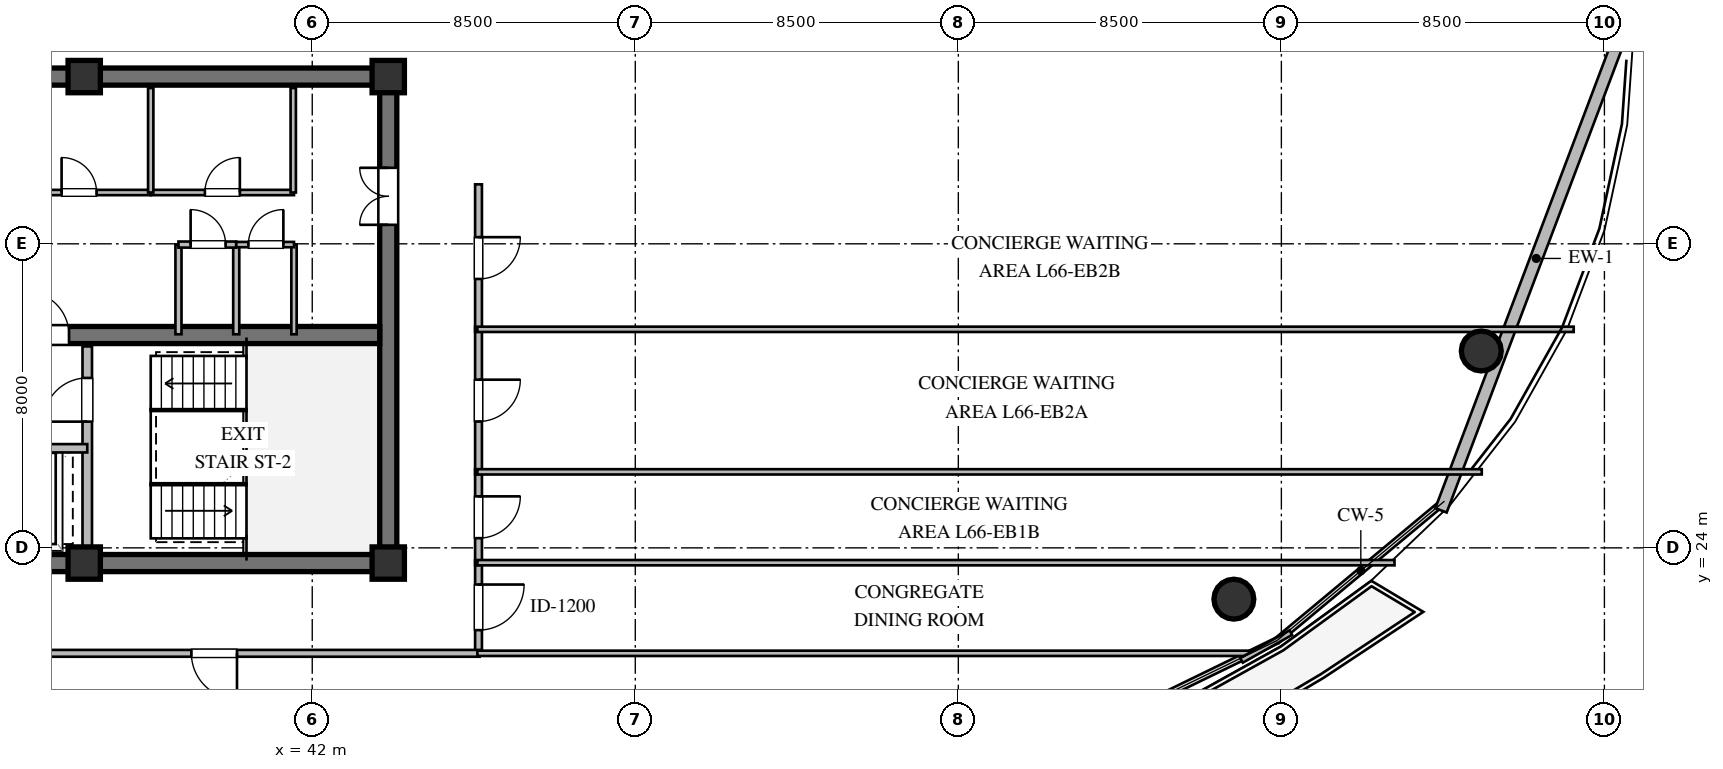
"""IFC4 building model, lengths in metres.
Left out: names, types, materials, properties, quantities, classifications, styles, units other than length and angle.
Written with IfcOpenShell. Run it as: python <this file> out.ifc"""

import sys

from ifc_helpers import new_model, si_unit, direction, frame, frame_2d, origin, origin_2d, place, context, subcontext, project, spatial, rectangle, circle, extrude, element, fill, save


model = new_model("IFC4")
c1 = context("Model", 3, precision=1e-05, world=origin(), true_north=direction((0.0, 1.0)))
c2 = subcontext(c1, "Body", "Model", "MODEL_VIEW")
j1 = project(units=[si_unit("LENGTHUNIT", "METRE"), si_unit("PLANEANGLEUNIT", "RADIAN")], contexts=[c1])
p1 = place(None, origin())
s1 = spatial("IfcSite", under=j1, at=p1, CompositionType="ELEMENT")
p2 = place(p1, origin())
s2 = spatial("IfcBuilding", under=s1, at=p2, CompositionType="ELEMENT")
p3 = place(p2, frame((0.0, 0.0, 249.6)))
s3 = spatial("IfcBuildingStorey", under=s2, at=p3, CompositionType="ELEMENT", Elevation=249.6)
for number, where, z_axis, x_axis in (
    (1, (21.775, 23.6, 0.0), (0.0, 0.0, 1.0), (1.0, 0.0, 0.0)),
    (2, (21.775, 36.4, 0.0), (0.0, 0.0, 1.0), (1.0, 0.0, 0.0)),
):
    element("IfcWall", number, at=place(p3, frame(where, z_axis=z_axis, x_axis=x_axis)), inside=s3, PredefinedType="SHEAR", context=c2, shape_type="SweptSolid", body=[
        extrude(rectangle(XDim=22.45, YDim=0.45, at=frame_2d((11.225, 0.0))), origin(), (0.0, 0.0, 1.0), 3.28),
    ])
p4 = place(p3, frame((44.0, 23.825, 0.0), z_axis=(0.0, 0.0, 1.0), x_axis=(0.0, 1.0, 0.0)))
e3 = element("IfcWall", 3, at=p4, inside=s3, PredefinedType="SHEAR", context=c2, shape_type="SweptSolid", body=[
    extrude(rectangle(XDim=12.35, YDim=0.45, at=frame_2d((6.175, 0.0))), origin(), (0.0, 0.0, 1.0), 3.28),
])
p5 = place(p4, frame((8.675, 0.0, 0.0)))
e4 = element("IfcOpeningElement", 4, at=p5, cuts=e3, PredefinedType="OPENING", context=c2, shape_type="SweptSolid", body=[
    extrude(rectangle(XDim=1.5, YDim=2.15, at=frame_2d((0.75, 1.075))), frame((0.0, 0.235, 0.0), z_axis=(0.0, -1.0, 0.0), x_axis=(1.0, 0.0, 0.0)), (0.0, 0.0, 1.0), 0.47),
])
p6 = place(p3, frame((22.225, 29.6, 0.0), z_axis=(0.0, 0.0, 1.0), x_axis=(1.0, 0.0, 0.0)))
e5 = element("IfcWall", 5, at=p6, inside=s3, PredefinedType="SHEAR", context=c2, shape_type="SweptSolid", body=[
    extrude(rectangle(XDim=21.55, YDim=0.45, at=frame_2d((10.775, 0.0))), origin(), (0.0, 0.0, 1.0), 3.28),
])
p7 = place(p6, frame((12.225, 0.0, 0.0)))
e6 = element("IfcOpeningElement", 6, at=p7, cuts=e5, PredefinedType="OPENING", context=c2, shape_type="SweptSolid", body=[
    extrude(rectangle(XDim=1.15, YDim=2.1, at=frame_2d((0.575, 1.05))), frame((0.0, 0.235, 0.0), z_axis=(0.0, -1.0, 0.0), x_axis=(1.0, 0.0, 0.0)), (0.0, 0.0, 1.0), 0.47),
])
for number, where, z_axis, x_axis in (
    (7, (36.0, 23.6, 0.0), (0.0, 0.0, 1.0), (1.0, 0.0, 0.0)),
    (8, (44.0, 23.6, 0.0), (0.0, 0.0, 1.0), (1.0, 0.0, 0.0)),
    (9, (44.0, 36.4, 0.0), (0.0, 0.0, 1.0), (1.0, 0.0, 0.0)),
    (10, (36.0, 36.4, 0.0), (0.0, 0.0, 1.0), (1.0, 0.0, 0.0)),
):
    element("IfcColumn", number, at=place(p3, frame(where, z_axis=z_axis, x_axis=x_axis)), inside=s3, PredefinedType="COLUMN", context=c2, shape_type="SweptSolid", body=[
        extrude(rectangle(XDim=0.85, YDim=0.85, at=origin_2d()), origin(), (0.0, 0.0, 1.0), 3.6),
    ])
for number, where, z_axis, x_axis in (
    (11, (66.25, 22.65, 0.0), (0.0, 0.0, 1.0), (1.0, 0.0, 0.0)),
    (12, (72.76, 29.18, 0.0), (0.0, 0.0, 1.0), (1.0, 0.0, 0.0)),
):
    element("IfcColumn", number, at=place(p3, frame(where, z_axis=z_axis, x_axis=x_axis)), inside=s3, PredefinedType="COLUMN", context=c2, shape_type="SweptSolid", body=[
        extrude(circle(Radius=0.525, at=origin_2d()), origin(), (0.0, 0.0, 1.0), 3.6),
    ])
p8 = place(p3, frame((76.712, 38.243, 0.0), z_axis=(0.0, 0.0, 1.0), x_axis=(-0.353659523244, -0.935374225441, 0.0)))
e13 = element("IfcWall", 13, at=p8, inside=s3, PredefinedType="STANDARD", context=c2, shape_type="SweptSolid", body=[
    extrude(rectangle(XDim=14.172, YDim=0.32, at=frame_2d((7.086, 0.0))), origin(), (0.0, 0.0, 1.0), 3.28),
])
p9 = place(p3, frame((36.08, 23.9, 0.0), z_axis=(0.0, 0.0, 1.0), x_axis=(0.0, 1.0, 0.0)))
e14 = element("IfcWall", 14, at=p9, inside=s3, PredefinedType="SOLIDWALL", context=c2, shape_type="SweptSolid", body=[
    extrude(rectangle(XDim=5.4, YDim=0.25, at=frame_2d((2.7, 0.0))), origin(), (0.0, 0.0, 1.0), 3.28),
])
p10 = place(p9, frame((3.421, 0.0, 0.0)))
e15 = element("IfcOpeningElement", 15, at=p10, cuts=e14, PredefinedType="OPENING", context=c2, shape_type="SweptSolid", body=[
    extrude(rectangle(XDim=1.15, YDim=2.1, at=frame_2d((0.575, 1.05))), frame((0.0, 0.135, 0.0), z_axis=(0.0, -1.0, 0.0), x_axis=(1.0, 0.0, 0.0)), (0.0, 0.0, 1.0), 0.27),
])
p11 = place(p3, frame((29.92, 26.62, 0.0), z_axis=(0.0, 0.0, 1.0), x_axis=(1.0, 0.0, 0.0)))
e16 = element("IfcWall", 16, at=p11, inside=s3, PredefinedType="SOLIDWALL", context=c2, shape_type="SweptSolid", body=[
    extrude(rectangle(XDim=6.16, YDim=0.22, at=frame_2d((3.08, 0.0))), origin(), (0.0, 0.0, 1.0), 3.28),
])
p12 = place(p11, frame((0.99, 0.0, 0.0)))
e17 = element("IfcOpeningElement", 17, at=p12, cuts=e16, PredefinedType="OPENING", context=c2, shape_type="SweptSolid", body=[
    extrude(rectangle(XDim=1.1, YDim=2.1, at=frame_2d((0.55, 1.05))), frame((0.0, 0.12, 0.0), z_axis=(0.0, -1.0, 0.0), x_axis=(1.0, 0.0, 0.0)), (0.0, 0.0, 1.0), 0.24),
])
p13 = place(p11, frame((4.07, 0.0, 0.0)))
e18 = element("IfcOpeningElement", 18, at=p13, cuts=e16, PredefinedType="OPENING", context=c2, shape_type="SweptSolid", body=[
    extrude(rectangle(XDim=1.1, YDim=2.1, at=frame_2d((0.55, 1.05))), frame((0.0, 0.12, 0.0), z_axis=(0.0, -1.0, 0.0), x_axis=(1.0, 0.0, 0.0)), (0.0, 0.0, 1.0), 0.24),
])
p14 = place(p3, frame((33.98, 33.35, 0.0), z_axis=(0.0, 0.0, 1.0), x_axis=(1.0, 0.0, 0.0)))
e19 = element("IfcWall", 19, at=p14, inside=s3, PredefinedType="PARTITIONING", context=c2, shape_type="SweptSolid", body=[
    extrude(rectangle(XDim=3.77, YDim=0.14, at=frame_2d((1.885, 0.0))), origin(), (0.0, 0.0, 1.0), 3.28),
])
p15 = place(p14, frame((1.425, 0.0, 0.0)))
e20 = element("IfcOpeningElement", 20, at=p15, cuts=e19, PredefinedType="OPENING", context=c2, shape_type="SweptSolid", body=[
    extrude(rectangle(XDim=0.92, YDim=2.1, at=frame_2d((0.46, 1.05))), frame((0.0, 0.08, 0.0), z_axis=(0.0, -1.0, 0.0), x_axis=(1.0, 0.0, 0.0)), (0.0, 0.0, 1.0), 0.16),
])
p16 = place(p3, frame((37.75, 33.35, 0.0), z_axis=(0.0, 0.0, 1.0), x_axis=(1.0, 0.0, 0.0)))
e21 = element("IfcWall", 21, at=p16, inside=s3, PredefinedType="PARTITIONING", context=c2, shape_type="SweptSolid", body=[
    extrude(rectangle(XDim=3.77, YDim=0.14, at=frame_2d((1.885, 0.0))), origin(), (0.0, 0.0, 1.0), 3.28),
])
p17 = place(p16, frame((1.425, 0.0, 0.0)))
e22 = element("IfcOpeningElement", 22, at=p17, cuts=e21, PredefinedType="OPENING", context=c2, shape_type="SweptSolid", body=[
    extrude(rectangle(XDim=0.92, YDim=2.1, at=frame_2d((0.46, 1.05))), frame((0.0, 0.08, 0.0), z_axis=(0.0, -1.0, 0.0), x_axis=(1.0, 0.0, 0.0)), (0.0, 0.0, 1.0), 0.16),
])
for number, where, z_axis, x_axis in (
    (23, (37.75, 33.35, 0.0), (0.0, 0.0, 1.0), (0.0, 1.0, 0.0)),
    (24, (41.5, 33.35, 0.0), (0.0, 0.0, 1.0), (0.0, 1.0, 0.0)),
):
    element("IfcWall", number, at=place(p3, frame(where, z_axis=z_axis, x_axis=x_axis)), inside=s3, PredefinedType="PARTITIONING", context=c2, shape_type="SweptSolid", body=[
        extrude(rectangle(XDim=2.75, YDim=0.14, at=frame_2d((1.375, 0.0))), origin(), (0.0, 0.0, 1.0), 3.28),
    ])
for number, where, z_axis, x_axis in (
    (25, (38.48, 29.62, 0.0), (0.0, 0.0, 1.0), (0.0, 1.0, 0.0)),
    (26, (40.0, 29.62, 0.0), (0.0, 0.0, 1.0), (0.0, 1.0, 0.0)),
):
    element("IfcWall", number, at=place(p3, frame(where, z_axis=z_axis, x_axis=x_axis)), inside=s3, PredefinedType="PLUMBINGWALL", context=c2, shape_type="SweptSolid", body=[
        extrude(rectangle(XDim=2.36, YDim=0.16, at=frame_2d((1.18, 0.0))), origin(), (0.0, 0.0, 1.0), 3.28),
    ])
p18 = place(p3, frame((41.52, 29.62, 0.0), z_axis=(0.0, 0.0, 1.0), x_axis=(0.0, 1.0, 0.0)))
e27 = element("IfcWall", 27, at=p18, inside=s3, PredefinedType="PARTITIONING", context=c2, shape_type="SweptSolid", body=[
    extrude(rectangle(XDim=2.36, YDim=0.14, at=frame_2d((1.18, 0.0))), origin(), (0.0, 0.0, 1.0), 3.28),
])
p19 = place(p3, frame((38.48, 31.98, 0.0), z_axis=(0.0, 0.0, 1.0), x_axis=(1.0, 0.0, 0.0)))
e28 = element("IfcWall", 28, at=p19, inside=s3, PredefinedType="PLUMBINGWALL", context=c2, shape_type="SweptSolid", body=[
    extrude(rectangle(XDim=1.52, YDim=0.16, at=frame_2d((0.76, 0.0))), origin(), (0.0, 0.0, 1.0), 3.28),
])
p20 = place(p19, frame((0.32, 0.0, 0.0)))
e29 = element("IfcOpeningElement", 29, at=p20, cuts=e28, PredefinedType="OPENING", context=c2, shape_type="SweptSolid", body=[
    extrude(rectangle(XDim=0.92, YDim=2.1, at=frame_2d((0.46, 1.05))), frame((0.0, 0.09, 0.0), z_axis=(0.0, -1.0, 0.0), x_axis=(1.0, 0.0, 0.0)), (0.0, 0.0, 1.0), 0.18),
])
p21 = place(p3, frame((40.0, 31.98, 0.0), z_axis=(0.0, 0.0, 1.0), x_axis=(1.0, 0.0, 0.0)))
e30 = element("IfcWall", 30, at=p21, inside=s3, PredefinedType="PARTITIONING", context=c2, shape_type="SweptSolid", body=[
    extrude(rectangle(XDim=1.52, YDim=0.14, at=frame_2d((0.76, 0.0))), origin(), (0.0, 0.0, 1.0), 3.28),
])
p22 = place(p21, frame((0.32, 0.0, 0.0)))
e31 = element("IfcOpeningElement", 31, at=p22, cuts=e30, PredefinedType="OPENING", context=c2, shape_type="SweptSolid", body=[
    extrude(rectangle(XDim=0.92, YDim=2.1, at=frame_2d((0.46, 1.05))), frame((0.0, 0.08, 0.0), z_axis=(0.0, -1.0, 0.0), x_axis=(1.0, 0.0, 0.0)), (0.0, 0.0, 1.0), 0.16),
])
p23 = place(p3, frame((46.375, 23.675, 0.0), z_axis=(0.0, 0.0, 1.0), x_axis=(0.0, -1.0, 0.0)))
e32 = element("IfcWall", 32, at=p23, inside=s3, PredefinedType="PARTITIONING", context=c2, shape_type="SweptSolid", body=[
    extrude(rectangle(XDim=2.48, YDim=0.18, at=frame_2d((1.24, 0.0))), origin(), (0.0, 0.0, 1.0), 3.28),
])
p24 = place(p23, frame((0.64, 0.0, 0.0)))
e33 = element("IfcOpeningElement", 33, at=p24, cuts=e32, PredefinedType="OPENING", context=c2, shape_type="SweptSolid", body=[
    extrude(rectangle(XDim=1.2, YDim=2.15, at=frame_2d((0.6, 1.075))), frame((0.0, 0.1, 0.0), z_axis=(0.0, -1.0, 0.0), x_axis=(1.0, 0.0, 0.0)), (0.0, 0.0, 1.0), 0.2),
])
p25 = place(p3, frame((46.375, 26.065, 0.0), z_axis=(0.0, 0.0, 1.0), x_axis=(0.0, -1.0, 0.0)))
e34 = element("IfcWall", 34, at=p25, inside=s3, PredefinedType="PARTITIONING", context=c2, shape_type="SweptSolid", body=[
    extrude(rectangle(XDim=2.52, YDim=0.18, at=frame_2d((1.26, 0.0))), origin(), (0.0, 0.0, 1.0), 3.28),
])
p26 = place(p25, frame((0.71, 0.0, 0.0)))
e35 = element("IfcOpeningElement", 35, at=p26, cuts=e34, PredefinedType="OPENING", context=c2, shape_type="SweptSolid", body=[
    extrude(rectangle(XDim=1.1, YDim=2.1, at=frame_2d((0.55, 1.05))), frame((0.0, 0.1, 0.0), z_axis=(0.0, -1.0, 0.0), x_axis=(1.0, 0.0, 0.0)), (0.0, 0.0, 1.0), 0.2),
])
p27 = place(p3, frame((46.375, 29.815, 0.0), z_axis=(0.0, 0.0, 1.0), x_axis=(0.0, -1.0, 0.0)))
e36 = element("IfcWall", 36, at=p27, inside=s3, PredefinedType="PARTITIONING", context=c2, shape_type="SweptSolid", body=[
    extrude(rectangle(XDim=3.88, YDim=0.18, at=frame_2d((1.94, 0.0))), origin(), (0.0, 0.0, 1.0), 3.28),
])
p28 = place(p27, frame((1.39, 0.0, 0.0)))
e37 = element("IfcOpeningElement", 37, at=p28, cuts=e36, PredefinedType="OPENING", context=c2, shape_type="SweptSolid", body=[
    extrude(rectangle(XDim=1.1, YDim=2.1, at=frame_2d((0.55, 1.05))), frame((0.0, 0.1, 0.0), z_axis=(0.0, -1.0, 0.0), x_axis=(1.0, 0.0, 0.0)), (0.0, 0.0, 1.0), 0.2),
])
p29 = place(p3, frame((46.375, 33.565, 0.0), z_axis=(0.0, 0.0, 1.0), x_axis=(0.0, -1.0, 0.0)))
e38 = element("IfcWall", 38, at=p29, inside=s3, PredefinedType="PARTITIONING", context=c2, shape_type="SweptSolid", body=[
    extrude(rectangle(XDim=3.88, YDim=0.18, at=frame_2d((1.94, 0.0))), origin(), (0.0, 0.0, 1.0), 3.28),
])
p30 = place(p29, frame((1.39, 0.0, 0.0)))
e39 = element("IfcOpeningElement", 39, at=p30, cuts=e38, PredefinedType="OPENING", context=c2, shape_type="SweptSolid", body=[
    extrude(rectangle(XDim=1.1, YDim=2.1, at=frame_2d((0.55, 1.05))), frame((0.0, 0.1, 0.0), z_axis=(0.0, -1.0, 0.0), x_axis=(1.0, 0.0, 0.0)), (0.0, 0.0, 1.0), 0.2),
])
p31 = place(p3, frame((46.405, 21.225, 0.0), z_axis=(0.0, 0.0, 1.0), x_axis=(-1.0, 0.0, 0.0)))
e40 = element("IfcWall", 40, at=p31, inside=s3, PredefinedType="PARTITIONING", context=c2, shape_type="SweptSolid", body=[
    extrude(rectangle(XDim=13.97, YDim=0.18, at=frame_2d((6.985, 0.0))), origin(), (0.0, 0.0, 1.0), 2.916),
])
p32 = place(p31, frame((6.385, 0.0, 0.0)))
e41 = element("IfcOpeningElement", 41, at=p32, cuts=e40, PredefinedType="OPENING", context=c2, shape_type="SweptSolid", body=[
    extrude(rectangle(XDim=1.2, YDim=2.15, at=frame_2d((0.6, 1.075))), frame((0.0, 0.1, 0.0), z_axis=(0.0, -1.0, 0.0), x_axis=(1.0, 0.0, 0.0)), (0.0, 0.0, 1.0), 0.2),
])
p33 = place(p3, frame((46.345, 23.61, 0.0), z_axis=(0.0, 0.0, 1.0), x_axis=(1.0, 0.0, 0.0)))
e42 = element("IfcWall", 42, at=p33, inside=s3, PredefinedType="PARTITIONING", context=c2, shape_type="SweptSolid", body=[
    extrude(rectangle(XDim=24.132, YDim=0.14, at=frame_2d((12.066, 0.0))), origin(), (0.0, 0.0, 1.0), 2.726),
])
p34 = place(p3, frame((66.684, 21.225, 0.0), z_axis=(0.0, 0.0, 1.0), x_axis=(-1.0, 0.0, 0.0)))
e43 = element("IfcWall", 43, at=p34, inside=s3, PredefinedType="PARTITIONING", context=c2, shape_type="SweptSolid", body=[
    extrude(rectangle(XDim=20.339, YDim=0.14, at=frame_2d((10.169, 0.0))), origin(), (0.0, 0.0, 1.0), 2.916),
])
p35 = place(p3, frame((67.748, 21.77, 0.0), z_axis=(0.0, 0.0, 1.0), x_axis=(-0.871352238731, -0.490658003153, 0.0)))
e44 = element("IfcWall", 44, at=p35, inside=s3, PredefinedType="PARTITIONING", context=c2, shape_type="SweptSolid", body=[
    extrude(rectangle(XDim=1.49, YDim=0.14, at=frame_2d((0.745, 0.0))), origin(), (0.0, 0.0, 1.0), 3.28),
])
p36 = place(p3, frame((46.345, 26.0, 0.0), z_axis=(0.0, 0.0, 1.0), x_axis=(1.0, 0.0, 0.0)))
e45 = element("IfcWall", 45, at=p36, inside=s3, PredefinedType="PARTITIONING", context=c2, shape_type="SweptSolid", body=[
    extrude(rectangle(XDim=26.428, YDim=0.14, at=frame_2d((13.214, 0.0))), origin(), (0.0, 0.0, 1.0), 2.726),
])
p37 = place(p3, frame((46.345, 29.75, 0.0), z_axis=(0.0, 0.0, 1.0), x_axis=(1.0, 0.0, 0.0)))
e46 = element("IfcWall", 46, at=p37, inside=s3, PredefinedType="PARTITIONING", context=c2, shape_type="SweptSolid", body=[
    extrude(rectangle(XDim=28.847, YDim=0.14, at=frame_2d((14.423, 0.0))), origin(), (0.0, 0.0, 1.0), 2.726),
])
p38 = place(p10, origin())
e47 = element("IfcDoor", 47, at=p38, inside=s3, OperationType="SINGLE_SWING_LEFT", PredefinedType="DOOR", context=c2, shape_type="SweptSolid", body=[
    extrude(rectangle(XDim=1.15, YDim=2.1, at=frame_2d((0.575, 1.05))), frame((0.0, 0.025, 0.0), z_axis=(0.0, -1.0, 0.0), x_axis=(1.0, 0.0, 0.0)), (0.0, 0.0, 1.0), 0.05),
])
fill(e15, e47)
p39 = place(p7, origin())
e48 = element("IfcDoor", 48, at=p39, inside=s3, OperationType="SINGLE_SWING_LEFT", PredefinedType="DOOR", context=c2, shape_type="SweptSolid", body=[
    extrude(rectangle(XDim=1.15, YDim=2.1, at=frame_2d((0.575, 1.05))), frame((0.0, 0.025, 0.0), z_axis=(0.0, -1.0, 0.0), x_axis=(1.0, 0.0, 0.0)), (0.0, 0.0, 1.0), 0.05),
])
fill(e6, e48)
p40 = place(p5, origin())
e49 = element("IfcDoor", 49, at=p40, inside=s3, OperationType="DOUBLE_DOOR_SINGLE_SWING", PredefinedType="DOOR", context=c2, shape_type="SweptSolid", body=[
    extrude(rectangle(XDim=1.5, YDim=2.15, at=frame_2d((0.75, 1.075))), frame((0.0, 0.025, 0.0), z_axis=(0.0, -1.0, 0.0), x_axis=(1.0, 0.0, 0.0)), (0.0, 0.0, 1.0), 0.05),
])
fill(e4, e49)
p41 = place(p15, origin())
e50 = element("IfcDoor", 50, at=p41, inside=s3, OperationType="SINGLE_SWING_LEFT", PredefinedType="DOOR", context=c2, shape_type="SweptSolid", body=[
    extrude(rectangle(XDim=0.92, YDim=2.1, at=frame_2d((0.46, 1.05))), frame((0.0, 0.025, 0.0), z_axis=(0.0, -1.0, 0.0), x_axis=(1.0, 0.0, 0.0)), (0.0, 0.0, 1.0), 0.05),
])
fill(e20, e50)
p42 = place(p17, origin())
e51 = element("IfcDoor", 51, at=p42, inside=s3, OperationType="SINGLE_SWING_RIGHT", PredefinedType="DOOR", context=c2, shape_type="SweptSolid", body=[
    extrude(rectangle(XDim=0.92, YDim=2.1, at=frame_2d((0.46, 1.05))), frame((0.0, 0.025, 0.0), z_axis=(0.0, -1.0, 0.0), x_axis=(1.0, 0.0, 0.0)), (0.0, 0.0, 1.0), 0.05),
])
fill(e22, e51)
p43 = place(p20, origin())
e52 = element("IfcDoor", 52, at=p43, inside=s3, OperationType="SINGLE_SWING_LEFT", PredefinedType="DOOR", context=c2, shape_type="SweptSolid", body=[
    extrude(rectangle(XDim=0.92, YDim=2.1, at=frame_2d((0.46, 1.05))), frame((0.0, 0.025, 0.0), z_axis=(0.0, -1.0, 0.0), x_axis=(1.0, 0.0, 0.0)), (0.0, 0.0, 1.0), 0.05),
])
fill(e29, e52)
p44 = place(p22, origin())
e53 = element("IfcDoor", 53, at=p44, inside=s3, OperationType="SINGLE_SWING_RIGHT", PredefinedType="DOOR", context=c2, shape_type="SweptSolid", body=[
    extrude(rectangle(XDim=0.92, YDim=2.1, at=frame_2d((0.46, 1.05))), frame((0.0, 0.025, 0.0), z_axis=(0.0, -1.0, 0.0), x_axis=(1.0, 0.0, 0.0)), (0.0, 0.0, 1.0), 0.05),
])
fill(e31, e53)
p45 = place(p24, origin())
e54 = element("IfcDoor", 54, at=p45, inside=s3, OperationType="SINGLE_SWING_LEFT", PredefinedType="DOOR", context=c2, shape_type="SweptSolid", body=[
    extrude(rectangle(XDim=1.2, YDim=2.15, at=frame_2d((0.6, 1.075))), frame((0.0, 0.025, 0.0), z_axis=(0.0, -1.0, 0.0), x_axis=(1.0, 0.0, 0.0)), (0.0, 0.0, 1.0), 0.05),
])
fill(e33, e54)
p46 = place(p26, origin())
e55 = element("IfcDoor", 55, at=p46, inside=s3, OperationType="SINGLE_SWING_LEFT", PredefinedType="DOOR", context=c2, shape_type="SweptSolid", body=[
    extrude(rectangle(XDim=1.1, YDim=2.1, at=frame_2d((0.55, 1.05))), frame((0.0, 0.025, 0.0), z_axis=(0.0, -1.0, 0.0), x_axis=(1.0, 0.0, 0.0)), (0.0, 0.0, 1.0), 0.05),
])
fill(e35, e55)
p47 = place(p28, origin())
e56 = element("IfcDoor", 56, at=p47, inside=s3, OperationType="SINGLE_SWING_LEFT", PredefinedType="DOOR", context=c2, shape_type="SweptSolid", body=[
    extrude(rectangle(XDim=1.1, YDim=2.1, at=frame_2d((0.55, 1.05))), frame((0.0, 0.025, 0.0), z_axis=(0.0, -1.0, 0.0), x_axis=(1.0, 0.0, 0.0)), (0.0, 0.0, 1.0), 0.05),
])
fill(e37, e56)
p48 = place(p30, origin())
e57 = element("IfcDoor", 57, at=p48, inside=s3, OperationType="SINGLE_SWING_LEFT", PredefinedType="DOOR", context=c2, shape_type="SweptSolid", body=[
    extrude(rectangle(XDim=1.1, YDim=2.1, at=frame_2d((0.55, 1.05))), frame((0.0, 0.025, 0.0), z_axis=(0.0, -1.0, 0.0), x_axis=(1.0, 0.0, 0.0)), (0.0, 0.0, 1.0), 0.05),
])
fill(e39, e57)
p49 = place(p32, origin())
e58 = element("IfcDoor", 58, at=p49, inside=s3, OperationType="SINGLE_SWING_LEFT", PredefinedType="DOOR", context=c2, shape_type="SweptSolid", body=[
    extrude(rectangle(XDim=1.2, YDim=2.15, at=frame_2d((0.6, 1.075))), frame((0.0, 0.025, 0.0), z_axis=(0.0, -1.0, 0.0), x_axis=(1.0, 0.0, 0.0)), (0.0, 0.0, 1.0), 0.05),
])
fill(e41, e58)
save(model, sys.argv[1])
